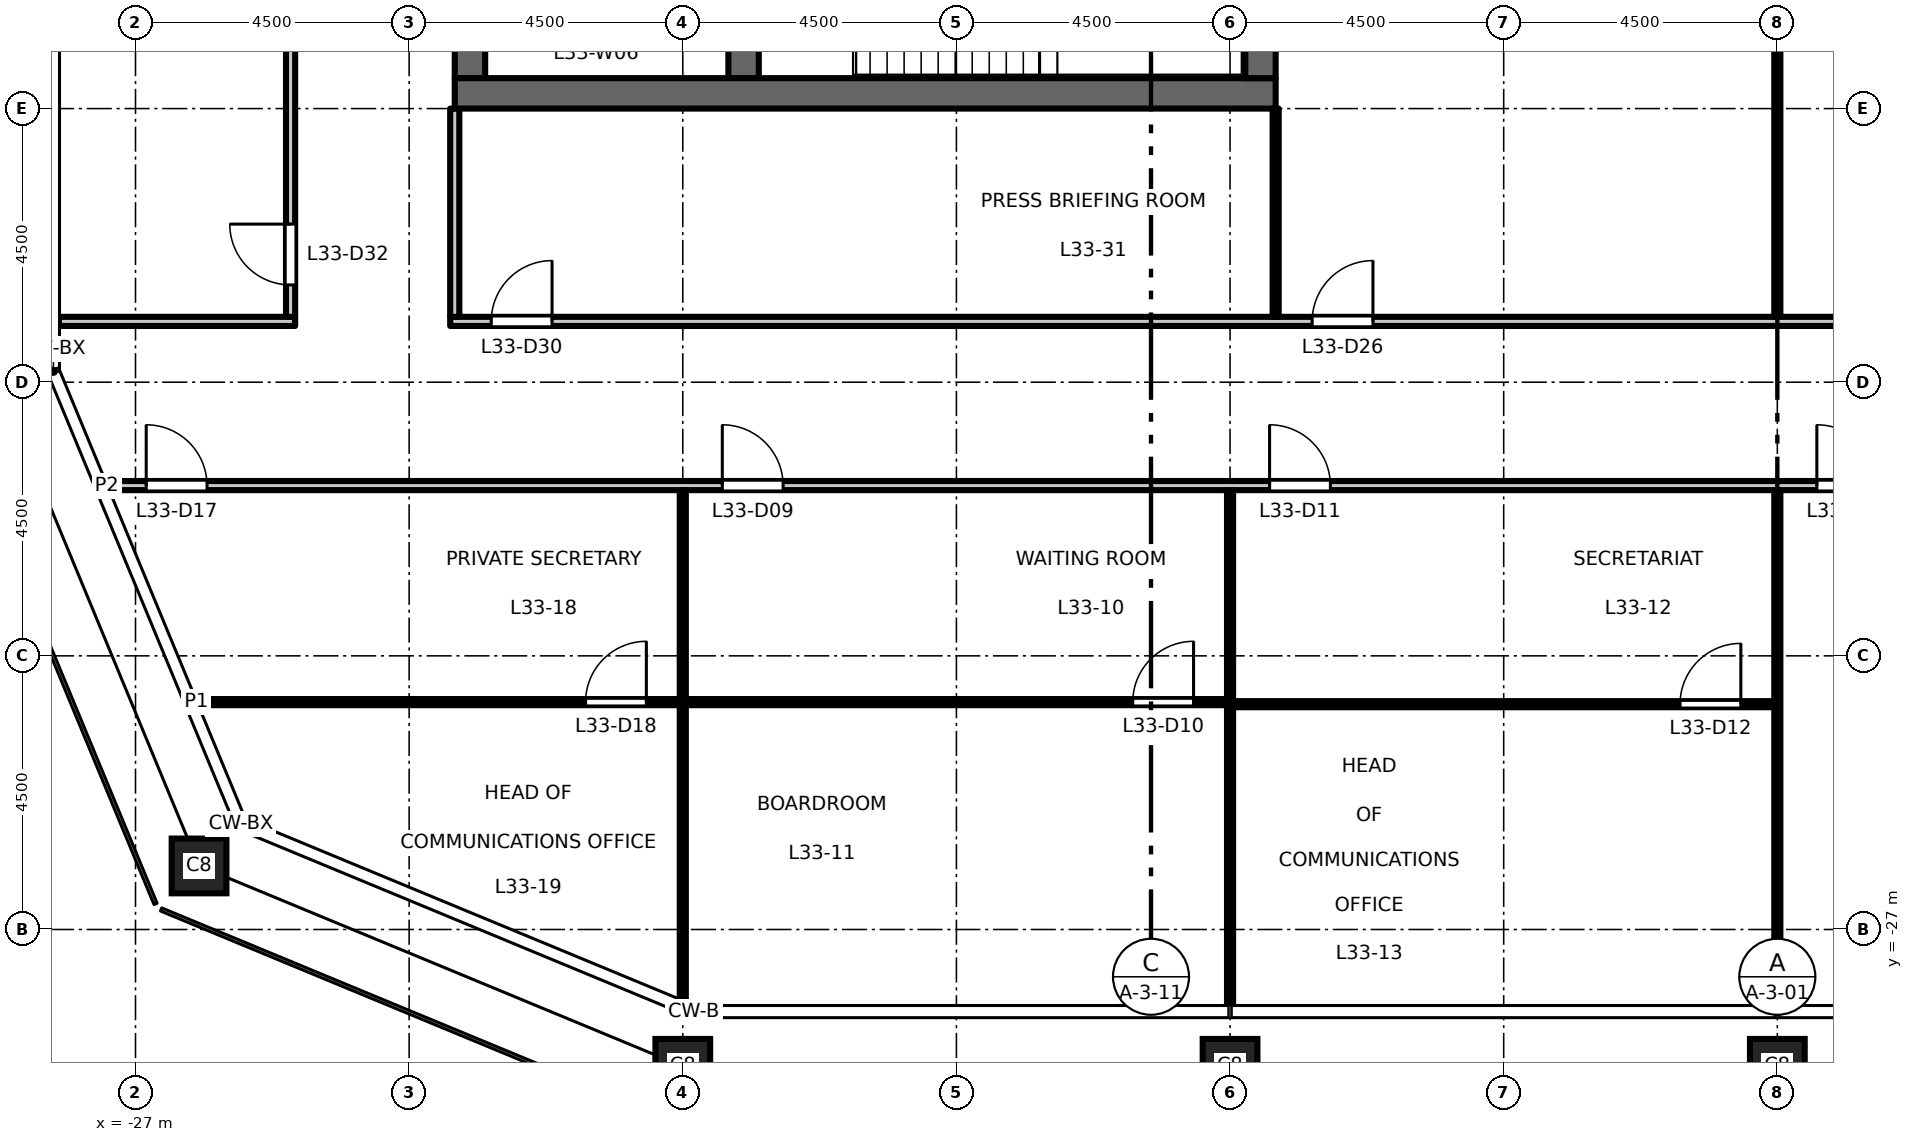
"""IFC4 building model, lengths in metres.
Left out: names, types, materials, properties, quantities, classifications, styles, units other than length and angle.
Written with IfcOpenShell. Run it as: python <this file> out.ifc"""

import sys

from ifc_helpers import new_model, si_unit, direction, frame, frame_2d, origin, origin_2d, place, context, subcontext, project, spatial, rectangle, hollow_rectangle, extrude, element, fill, save


model = new_model("IFC4")
c1 = context("Model", 3, precision=1e-05, world=origin(), true_north=direction((0.0, 1.0)))
c2 = subcontext(c1, "Body", "Model", "MODEL_VIEW")
j1 = project(units=[si_unit("LENGTHUNIT", "METRE"), si_unit("PLANEANGLEUNIT", "RADIAN")], contexts=[c1])
p1 = place(None, origin())
s1 = spatial("IfcSite", under=j1, at=p1, CompositionType="ELEMENT")
p2 = place(p1, origin())
s2 = spatial("IfcBuilding", under=s1, at=p2, CompositionType="ELEMENT")
p3 = place(p2, frame((0.0, 0.0, 154.2)))
s3 = spatial("IfcBuildingStorey", under=s2, at=p3, CompositionType="ELEMENT", Elevation=154.2)
for number, where, z_axis, x_axis in (
    (1, (-18.0, -29.25, 0.0), (0.0, 0.0, 1.0), (1.0, 0.0, 0.0)),
    (2, (-9.0, -29.25, 0.0), (0.0, 0.0, 1.0), (1.0, 0.0, 0.0)),
    (3, (0.0, -29.25, 0.0), (0.0, 0.0, 1.0), (1.0, 0.0, 0.0)),
    (4, (-25.955, -25.955, 0.0), (0.0, 0.0, 1.0), (1.0, 0.0, 0.0)),
):
    element("IfcColumn", number, at=place(p3, frame(where, z_axis=z_axis, x_axis=x_axis)), inside=s3, PredefinedType="COLUMN", context=c2, shape_type="SweptSolid", body=[
        extrude(hollow_rectangle(XDim=0.9, YDim=0.9, WallThickness=0.05, at=origin_2d()), origin(), (0.0, 0.0, 1.0), 4.5),
    ])
p4 = place(p3, frame((-21.5, -13.0, 0.0), z_axis=(0.0, 0.0, 1.0), x_axis=(0.0, 1.0, 0.0)))
e5 = element("IfcWall", 5, at=p4, inside=s3, PredefinedType="SHEAR", context=c2, shape_type="SweptSolid", body=[
    extrude(rectangle(XDim=26.0, YDim=0.5, at=frame_2d((13.0, 0.0))), origin(), (0.0, 0.0, 1.0), 4.35),
])
p5 = place(p4, frame((16.825, 0.0, 0.0)))
e6 = element("IfcOpeningElement", 6, at=p5, cuts=e5, PredefinedType="OPENING", context=c2, shape_type="SweptSolid", body=[
    extrude(rectangle(XDim=1.8, YDim=2.1, at=frame_2d((0.9, 1.05))), frame((0.0, 0.26, 0.0), z_axis=(0.0, -1.0, 0.0), x_axis=(1.0, 0.0, 0.0)), (0.0, 0.0, 1.0), 0.52),
])
p6 = place(p4, frame((7.375, 0.0, 0.0)))
e7 = element("IfcOpeningElement", 7, at=p6, cuts=e5, PredefinedType="OPENING", context=c2, shape_type="SweptSolid", body=[
    extrude(rectangle(XDim=1.8, YDim=2.1, at=frame_2d((0.9, 1.05))), frame((0.0, 0.26, 0.0), z_axis=(0.0, -1.0, 0.0), x_axis=(1.0, 0.0, 0.0)), (0.0, 0.0, 1.0), 0.52),
])
p7 = place(p4, frame((1.3, 0.0, 0.0)))
e8 = element("IfcOpeningElement", 8, at=p7, cuts=e5, PredefinedType="OPENING", context=c2, shape_type="SweptSolid", body=[
    extrude(rectangle(XDim=0.9, YDim=2.1, at=frame_2d((0.45, 1.05))), frame((0.0, 0.26, 0.0), z_axis=(0.0, -1.0, 0.0), x_axis=(1.0, 0.0, 0.0)), (0.0, 0.0, 1.0), 0.52),
])
p8 = place(p3, frame((-17.0, -13.0, 0.0), z_axis=(0.0, 0.0, 1.0), x_axis=(0.0, 1.0, 0.0)))
e9 = element("IfcWall", 9, at=p8, inside=s3, PredefinedType="SHEAR", context=c2, shape_type="SweptSolid", body=[
    extrude(rectangle(XDim=6.575, YDim=0.5, at=frame_2d((3.288, 0.0))), origin(), (0.0, 0.0, 1.0), 4.35),
])
p9 = place(p3, frame((-8.25, -13.25, 0.0), z_axis=(0.0, 0.0, 1.0), x_axis=(-1.0, 0.0, 0.0)))
e10 = element("IfcWall", 10, at=p9, inside=s3, PredefinedType="SHEAR", context=c2, shape_type="SweptSolid", body=[
    extrude(rectangle(XDim=13.5, YDim=0.5, at=frame_2d((6.75, 0.0))), origin(), (0.0, 0.0, 1.0), 4.35),
])
p10 = place(p3, frame((-8.5, -13.0, 0.0), z_axis=(0.0, 0.0, 1.0), x_axis=(0.0, 1.0, 0.0)))
e11 = element("IfcWall", 11, at=p10, inside=s3, PredefinedType="SHEAR", context=c2, shape_type="SweptSolid", body=[
    extrude(rectangle(XDim=26.0, YDim=0.5, at=frame_2d((13.0, 0.0))), origin(), (0.0, 0.0, 1.0), 4.35),
])
p11 = place(p3, frame((-8.95, -23.295, 0.0), z_axis=(0.0, 0.0, 1.0), x_axis=(1.0, 0.0, 0.0)))
e12 = element("IfcWall", 12, at=p11, inside=s3, PredefinedType="PARTITIONING", context=c2, shape_type="SweptSolid", body=[
    extrude(rectangle(XDim=8.9, YDim=0.1, at=frame_2d((4.45, 0.0))), origin(), (0.0, 0.0, 1.0), 4.35),
])
p12 = place(p11, frame((7.35, 0.0, 0.0)))
e13 = element("IfcOpeningElement", 13, at=p12, cuts=e12, PredefinedType="OPENING", context=c2, shape_type="SweptSolid", body=[
    extrude(rectangle(XDim=1.0, YDim=2.1, at=frame_2d((0.5, 1.05))), frame((0.0, 0.06, 0.0), z_axis=(0.0, -1.0, 0.0), x_axis=(1.0, 0.0, 0.0)), (0.0, 0.0, 1.0), 0.12),
])
p13 = place(p3, frame((-25.999, -23.261, 0.0), z_axis=(0.0, 0.0, 1.0), x_axis=(1.0, 0.0, 0.0)))
e14 = element("IfcWall", 14, at=p13, inside=s3, PredefinedType="PARTITIONING", context=c2, shape_type="SweptSolid", body=[
    extrude(rectangle(XDim=16.949, YDim=0.1, at=frame_2d((8.475, 0.0))), origin(), (0.0, 0.0, 1.0), 4.35),
])
p14 = place(p13, frame((15.399, 0.0, 0.0)))
e15 = element("IfcOpeningElement", 15, at=p14, cuts=e14, PredefinedType="OPENING", context=c2, shape_type="SweptSolid", body=[
    extrude(rectangle(XDim=1.0, YDim=2.1, at=frame_2d((0.5, 1.05))), frame((0.0, 0.06, 0.0), z_axis=(0.0, -1.0, 0.0), x_axis=(1.0, 0.0, 0.0)), (0.0, 0.0, 1.0), 0.12),
])
p15 = place(p13, frame((6.4, 0.0, 0.0)))
e16 = element("IfcOpeningElement", 16, at=p15, cuts=e14, PredefinedType="OPENING", context=c2, shape_type="SweptSolid", body=[
    extrude(rectangle(XDim=1.0, YDim=2.1, at=frame_2d((0.5, 1.05))), frame((0.0, 0.06, 0.0), z_axis=(0.0, -1.0, 0.0), x_axis=(1.0, 0.0, 0.0)), (0.0, 0.0, 1.0), 0.12),
])
p16 = place(p3, frame((-27.474, -19.7, 0.0), z_axis=(0.0, 0.0, 1.0), x_axis=(1.0, 0.0, 0.0)))
e17 = element("IfcWall", 17, at=p16, inside=s3, PredefinedType="PARTITIONING", context=c2, shape_type="SweptSolid", body=[
    extrude(rectangle(XDim=54.948, YDim=0.15, at=frame_2d((27.474, 0.0))), origin(), (0.0, 0.0, 1.0), 4.35),
])
p17 = place(p16, frame((10.124, 0.0, 0.0)))
e18 = element("IfcOpeningElement", 18, at=p17, cuts=e17, PredefinedType="OPENING", context=c2, shape_type="SweptSolid", body=[
    extrude(rectangle(XDim=1.0, YDim=2.1, at=frame_2d((0.5, 1.05))), frame((0.0, 0.085, 0.0), z_axis=(0.0, -1.0, 0.0), x_axis=(1.0, 0.0, 0.0)), (0.0, 0.0, 1.0), 0.17),
])
p18 = place(p16, frame((19.124, 0.0, 0.0)))
e19 = element("IfcOpeningElement", 19, at=p18, cuts=e17, PredefinedType="OPENING", context=c2, shape_type="SweptSolid", body=[
    extrude(rectangle(XDim=1.0, YDim=2.1, at=frame_2d((0.5, 1.05))), frame((0.0, 0.085, 0.0), z_axis=(0.0, -1.0, 0.0), x_axis=(1.0, 0.0, 0.0)), (0.0, 0.0, 1.0), 0.17),
])
p19 = place(p16, frame((28.124, 0.0, 0.0)))
e20 = element("IfcOpeningElement", 20, at=p19, cuts=e17, PredefinedType="OPENING", context=c2, shape_type="SweptSolid", body=[
    extrude(rectangle(XDim=1.0, YDim=2.1, at=frame_2d((0.5, 1.05))), frame((0.0, 0.085, 0.0), z_axis=(0.0, -1.0, 0.0), x_axis=(1.0, 0.0, 0.0)), (0.0, 0.0, 1.0), 0.17),
])
p20 = place(p16, frame((43.874, 0.0, 0.0)))
e21 = element("IfcOpeningElement", 21, at=p20, cuts=e17, PredefinedType="OPENING", context=c2, shape_type="SweptSolid", body=[
    extrude(rectangle(XDim=1.0, YDim=2.1, at=frame_2d((0.5, 1.05))), frame((0.0, 0.085, 0.0), z_axis=(0.0, -1.0, 0.0), x_axis=(1.0, 0.0, 0.0)), (0.0, 0.0, 1.0), 0.17),
])
p21 = place(p16, frame((0.65, 0.0, 0.0)))
e22 = element("IfcOpeningElement", 22, at=p21, cuts=e17, PredefinedType="OPENING", context=c2, shape_type="SweptSolid", body=[
    extrude(rectangle(XDim=1.0, YDim=2.1, at=frame_2d((0.5, 1.05))), frame((0.0, 0.085, 0.0), z_axis=(0.0, -1.0, 0.0), x_axis=(1.0, 0.0, 0.0)), (0.0, 0.0, 1.0), 0.17),
])
p22 = place(p16, frame((46.124, 0.0, 0.0)))
e23 = element("IfcOpeningElement", 23, at=p22, cuts=e17, PredefinedType="OPENING", context=c2, shape_type="SweptSolid", body=[
    extrude(rectangle(XDim=1.0, YDim=2.1, at=frame_2d((0.5, 1.05))), frame((0.0, 0.085, 0.0), z_axis=(0.0, -1.0, 0.0), x_axis=(1.0, 0.0, 0.0)), (0.0, 0.0, 1.0), 0.17),
])
p23 = place(p3, frame((-28.26, -17.0, 0.0), z_axis=(0.0, 0.0, 1.0), x_axis=(1.0, 0.0, 0.0)))
e24 = element("IfcWall", 24, at=p23, inside=s3, PredefinedType="PARTITIONING", context=c2, shape_type="SweptSolid", body=[
    extrude(rectangle(XDim=3.885, YDim=0.15, at=frame_2d((1.942, 0.0))), origin(), (0.0, 0.0, 1.0), 4.35),
])
p24 = place(p3, frame((-21.825, -17.0, 0.0), z_axis=(0.0, 0.0, 1.0), x_axis=(1.0, 0.0, 0.0)))
e25 = element("IfcWall", 25, at=p24, inside=s3, PredefinedType="PARTITIONING", context=c2, shape_type="SweptSolid", body=[
    extrude(rectangle(XDim=43.65, YDim=0.15, at=frame_2d((21.825, 0.0))), origin(), (0.0, 0.0, 1.0), 4.35),
])
p25 = place(p24, frame((14.175, 0.0, 0.0)))
e26 = element("IfcOpeningElement", 26, at=p25, cuts=e25, PredefinedType="OPENING", context=c2, shape_type="SweptSolid", body=[
    extrude(rectangle(XDim=1.0, YDim=2.1, at=frame_2d((0.5, 1.05))), frame((0.0, 0.085, 0.0), z_axis=(0.0, -1.0, 0.0), x_axis=(1.0, 0.0, 0.0)), (0.0, 0.0, 1.0), 0.17),
])
p26 = place(p24, frame((28.425, 0.0, 0.0)))
e27 = element("IfcOpeningElement", 27, at=p26, cuts=e25, PredefinedType="OPENING", context=c2, shape_type="SweptSolid", body=[
    extrude(rectangle(XDim=1.0, YDim=2.1, at=frame_2d((0.5, 1.05))), frame((0.0, 0.085, 0.0), z_axis=(0.0, -1.0, 0.0), x_axis=(1.0, 0.0, 0.0)), (0.0, 0.0, 1.0), 0.17),
])
p27 = place(p24, frame((0.675, 0.0, 0.0)))
e28 = element("IfcOpeningElement", 28, at=p27, cuts=e25, PredefinedType="OPENING", context=c2, shape_type="SweptSolid", body=[
    extrude(rectangle(XDim=1.0, YDim=2.1, at=frame_2d((0.5, 1.05))), frame((0.0, 0.085, 0.0), z_axis=(0.0, -1.0, 0.0), x_axis=(1.0, 0.0, 0.0)), (0.0, 0.0, 1.0), 0.17),
])
p28 = place(p24, frame((41.925, 0.0, 0.0)))
e29 = element("IfcOpeningElement", 29, at=p28, cuts=e25, PredefinedType="OPENING", context=c2, shape_type="SweptSolid", body=[
    extrude(rectangle(XDim=1.0, YDim=2.1, at=frame_2d((0.5, 1.05))), frame((0.0, 0.085, 0.0), z_axis=(0.0, -1.0, 0.0), x_axis=(1.0, 0.0, 0.0)), (0.0, 0.0, 1.0), 0.17),
])
p29 = place(p3, frame((-24.45, -16.925, 0.0), z_axis=(0.0, 0.0, 1.0), x_axis=(0.0, 1.0, 0.0)))
e30 = element("IfcWall", 30, at=p29, inside=s3, PredefinedType="PARTITIONING", context=c2, shape_type="SweptSolid", body=[
    extrude(rectangle(XDim=33.85, YDim=0.15, at=frame_2d((16.925, 0.0))), origin(), (0.0, 0.0, 1.0), 4.35),
])
p30 = place(p29, frame((0.525, 0.0, 0.0)))
e31 = element("IfcOpeningElement", 31, at=p30, cuts=e30, PredefinedType="OPENING", context=c2, shape_type="SweptSolid", body=[
    extrude(rectangle(XDim=1.0, YDim=2.1, at=frame_2d((0.5, 1.05))), frame((0.0, 0.085, 0.0), z_axis=(0.0, -1.0, 0.0), x_axis=(1.0, 0.0, 0.0)), (0.0, 0.0, 1.0), 0.17),
])
p31 = place(p3, frame((-21.75, -16.925, 0.0), z_axis=(0.0, 0.0, 1.0), x_axis=(0.0, 1.0, 0.0)))
e32 = element("IfcWall", 32, at=p31, inside=s3, PredefinedType="PARTITIONING", context=c2, shape_type="SweptSolid", body=[
    extrude(rectangle(XDim=3.425, YDim=0.15, at=frame_2d((1.712, 0.0))), origin(), (0.0, 0.0, 1.0), 4.35),
])
p32 = place(p3, frame((-18.0, -28.178, 0.0), z_axis=(0.0, 0.0, 1.0), x_axis=(0.0, 1.0, 0.0)))
e33 = element("IfcWall", 33, at=p32, inside=s3, PredefinedType="PARTITIONING", context=c2, shape_type="SweptSolid", body=[
    extrude(rectangle(XDim=4.867, YDim=0.1, at=frame_2d((2.434, 0.0))), origin(), (0.0, 0.0, 1.0), 3.45),
])
p33 = place(p3, frame((-18.0, -23.211, 0.0), z_axis=(0.0, 0.0, 1.0), x_axis=(0.0, 1.0, 0.0)))
e34 = element("IfcWall", 34, at=p33, inside=s3, PredefinedType="PARTITIONING", context=c2, shape_type="SweptSolid", body=[
    extrude(rectangle(XDim=3.436, YDim=0.1, at=frame_2d((1.718, 0.0))), origin(), (0.0, 0.0, 1.0), 3.45),
])
p34 = place(p3, frame((-9.0, -28.26, 0.0), z_axis=(0.0, 0.0, 1.0), x_axis=(0.0, 1.0, 0.0)))
e35 = element("IfcWall", 35, at=p34, inside=s3, PredefinedType="PARTITIONING", context=c2, shape_type="SweptSolid", body=[
    extrude(rectangle(XDim=8.485, YDim=0.1, at=frame_2d((4.243, 0.0))), origin(), (0.0, 0.0, 1.0), 3.45),
])
p35 = place(p3, frame((-8.25, -16.925, 0.0), z_axis=(0.0, 0.0, 1.0), x_axis=(0.0, 1.0, 0.0)))
e36 = element("IfcWall", 36, at=p35, inside=s3, PredefinedType="PARTITIONING", context=c2, shape_type="SweptSolid", body=[
    extrude(rectangle(XDim=3.425, YDim=0.1, at=frame_2d((1.712, 0.0))), origin(), (0.0, 0.0, 1.0), 4.35),
])
p36 = place(p3, frame((0.0, -28.26, 0.0), z_axis=(0.0, 0.0, 1.0), x_axis=(0.0, 1.0, 0.0)))
e37 = element("IfcWall", 37, at=p36, inside=s3, PredefinedType="PARTITIONING", context=c2, shape_type="SweptSolid", body=[
    extrude(rectangle(XDim=8.485, YDim=0.1, at=frame_2d((4.243, 0.0))), origin(), (0.0, 0.0, 1.0), 3.45),
])
p37 = place(p3, frame((0.0, -16.925, 0.0), z_axis=(0.0, 0.0, 1.0), x_axis=(0.0, 1.0, 0.0)))
e38 = element("IfcWall", 38, at=p37, inside=s3, PredefinedType="PARTITIONING", context=c2, shape_type="SweptSolid", body=[
    extrude(rectangle(XDim=8.275, YDim=0.1, at=frame_2d((4.138, 0.0))), origin(), (0.0, 0.0, 1.0), 3.45),
])
p38 = place(p17, origin())
e39 = element("IfcDoor", 39, at=p38, inside=s3, OperationType="SINGLE_SWING_LEFT", PredefinedType="DOOR", context=c2, shape_type="SweptSolid", body=[
    extrude(rectangle(XDim=1.0, YDim=2.1, at=frame_2d((0.5, 1.05))), frame((0.0, 0.025, 0.0), z_axis=(0.0, -1.0, 0.0), x_axis=(1.0, 0.0, 0.0)), (0.0, 0.0, 1.0), 0.05),
])
fill(e18, e39)
p39 = place(p14, origin())
e40 = element("IfcDoor", 40, at=p39, inside=s3, OperationType="SINGLE_SWING_RIGHT", PredefinedType="DOOR", context=c2, shape_type="SweptSolid", body=[
    extrude(rectangle(XDim=1.0, YDim=2.1, at=frame_2d((0.5, 1.05))), frame((0.0, 0.025, 0.0), z_axis=(0.0, -1.0, 0.0), x_axis=(1.0, 0.0, 0.0)), (0.0, 0.0, 1.0), 0.05),
])
fill(e15, e40)
p40 = place(p18, origin())
e41 = element("IfcDoor", 41, at=p40, inside=s3, OperationType="SINGLE_SWING_LEFT", PredefinedType="DOOR", context=c2, shape_type="SweptSolid", body=[
    extrude(rectangle(XDim=1.0, YDim=2.1, at=frame_2d((0.5, 1.05))), frame((0.0, 0.025, 0.0), z_axis=(0.0, -1.0, 0.0), x_axis=(1.0, 0.0, 0.0)), (0.0, 0.0, 1.0), 0.05),
])
fill(e19, e41)
p41 = place(p12, origin())
e42 = element("IfcDoor", 42, at=p41, inside=s3, OperationType="SINGLE_SWING_RIGHT", PredefinedType="DOOR", context=c2, shape_type="SweptSolid", body=[
    extrude(rectangle(XDim=1.0, YDim=2.1, at=frame_2d((0.5, 1.05))), frame((0.0, 0.025, 0.0), z_axis=(0.0, -1.0, 0.0), x_axis=(1.0, 0.0, 0.0)), (0.0, 0.0, 1.0), 0.05),
])
fill(e13, e42)
p42 = place(p19, origin())
e43 = element("IfcDoor", 43, at=p42, inside=s3, OperationType="SINGLE_SWING_LEFT", PredefinedType="DOOR", context=c2, shape_type="SweptSolid", body=[
    extrude(rectangle(XDim=1.0, YDim=2.1, at=frame_2d((0.5, 1.05))), frame((0.0, 0.025, 0.0), z_axis=(0.0, -1.0, 0.0), x_axis=(1.0, 0.0, 0.0)), (0.0, 0.0, 1.0), 0.05),
])
fill(e20, e43)
p43 = place(p21, origin())
e44 = element("IfcDoor", 44, at=p43, inside=s3, OperationType="SINGLE_SWING_LEFT", PredefinedType="DOOR", context=c2, shape_type="SweptSolid", body=[
    extrude(rectangle(XDim=1.0, YDim=2.1, at=frame_2d((0.5, 1.05))), frame((0.0, 0.025, 0.0), z_axis=(0.0, -1.0, 0.0), x_axis=(1.0, 0.0, 0.0)), (0.0, 0.0, 1.0), 0.05),
])
fill(e22, e44)
p44 = place(p15, origin())
e45 = element("IfcDoor", 45, at=p44, inside=s3, OperationType="SINGLE_SWING_RIGHT", PredefinedType="DOOR", context=c2, shape_type="SweptSolid", body=[
    extrude(rectangle(XDim=1.0, YDim=2.1, at=frame_2d((0.5, 1.05))), frame((0.0, 0.025, 0.0), z_axis=(0.0, -1.0, 0.0), x_axis=(1.0, 0.0, 0.0)), (0.0, 0.0, 1.0), 0.05),
])
fill(e16, e45)
p45 = place(p25, origin())
e46 = element("IfcDoor", 46, at=p45, inside=s3, OperationType="SINGLE_SWING_RIGHT", PredefinedType="DOOR", context=c2, shape_type="SweptSolid", body=[
    extrude(rectangle(XDim=1.0, YDim=2.1, at=frame_2d((0.5, 1.05))), frame((0.0, 0.025, 0.0), z_axis=(0.0, -1.0, 0.0), x_axis=(1.0, 0.0, 0.0)), (0.0, 0.0, 1.0), 0.05),
])
fill(e26, e46)
p46 = place(p27, origin())
e47 = element("IfcDoor", 47, at=p46, inside=s3, OperationType="SINGLE_SWING_RIGHT", PredefinedType="DOOR", context=c2, shape_type="SweptSolid", body=[
    extrude(rectangle(XDim=1.0, YDim=2.1, at=frame_2d((0.5, 1.05))), frame((0.0, 0.025, 0.0), z_axis=(0.0, -1.0, 0.0), x_axis=(1.0, 0.0, 0.0)), (0.0, 0.0, 1.0), 0.05),
])
fill(e28, e47)
p47 = place(p30, origin())
e48 = element("IfcDoor", 48, at=p47, inside=s3, OperationType="SINGLE_SWING_RIGHT", PredefinedType="DOOR", context=c2, shape_type="SweptSolid", body=[
    extrude(rectangle(XDim=1.0, YDim=2.1, at=frame_2d((0.5, 1.05))), frame((0.0, 0.025, 0.0), z_axis=(0.0, -1.0, 0.0), x_axis=(1.0, 0.0, 0.0)), (0.0, 0.0, 1.0), 0.05),
])
fill(e31, e48)
save(model, sys.argv[1])
